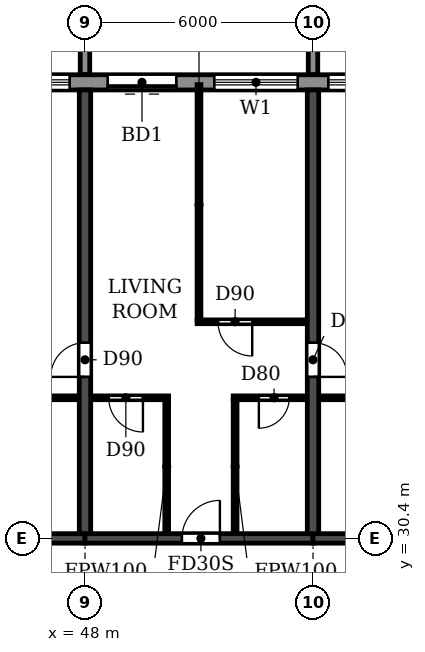
"""IFC4 building model, lengths in metres.
Left out: names, types, materials, properties, quantities, classifications, styles, units other than length and angle.
Written with IfcOpenShell. Run it as: python <this file> out.ifc"""

import sys

from ifc_helpers import new_model, si_unit, direction, frame, frame_2d, origin, place, context, subcontext, project, spatial, polyline, rectangle, outline, extrude, source, transform, mapped, element, fill, save


model = new_model("IFC4")
c1 = context("Model", 3, precision=1e-05, world=origin(), true_north=direction((0.0, 1.0)))
c2 = subcontext(c1, "Body", "Model", "MODEL_VIEW")
j1 = project(units=[si_unit("LENGTHUNIT", "METRE"), si_unit("PLANEANGLEUNIT", "RADIAN")], contexts=[c1])
p1 = place(None, origin())
s1 = spatial("IfcSite", under=j1, at=p1, CompositionType="ELEMENT")
p2 = place(p1, origin())
s2 = spatial("IfcBuilding", under=s1, at=p2, CompositionType="ELEMENT")
p3 = place(p2, frame((0.0, 0.0, 122.4)))
s3 = spatial("IfcBuildingStorey", under=s2, at=p3, CompositionType="ELEMENT", Elevation=122.4)
p4 = place(p3, frame((48.0, 30.525, 0.0), z_axis=(0.0, 0.0, 1.0), x_axis=(0.0, 1.0, 0.0)))
e1 = element("IfcWall", 1, at=p4, inside=s3, PredefinedType="SHEAR", context=c2, shape_type="SweptSolid", body=[
    extrude(rectangle(XDim=11.675, YDim=0.3, at=frame_2d((5.837, 0.0))), origin(), (0.0, 0.0, 1.0), 3.07),
])
p5 = place(p4, frame((4.125, 0.0, 0.0)))
e2 = element("IfcOpeningElement", 2, at=p5, cuts=e1, PredefinedType="OPENING", context=c2, shape_type="SweptSolid", body=[
    extrude(rectangle(XDim=0.9, YDim=2.1, at=frame_2d((0.45, 1.05))), frame((0.0, 0.16, 0.0), z_axis=(0.0, -1.0, 0.0), x_axis=(1.0, 0.0, 0.0)), (0.0, 0.0, 1.0), 0.32),
])
p6 = place(p3, frame((54.0, 30.525, 0.0), z_axis=(0.0, 0.0, 1.0), x_axis=(0.0, 1.0, 0.0)))
e3 = element("IfcWall", 3, at=p6, inside=s3, PredefinedType="SHEAR", context=c2, shape_type="SweptSolid", body=[
    extrude(rectangle(XDim=11.675, YDim=0.3, at=frame_2d((5.837, 0.0))), origin(), (0.0, 0.0, 1.0), 3.07),
])
p7 = place(p6, frame((4.125, 0.0, 0.0)))
e4 = element("IfcOpeningElement", 4, at=p7, cuts=e3, PredefinedType="OPENING", context=c2, shape_type="SweptSolid", body=[
    extrude(rectangle(XDim=0.9, YDim=2.1, at=frame_2d((0.45, 1.05))), frame((0.0, 0.16, 0.0), z_axis=(0.0, -1.0, 0.0), x_axis=(1.0, 0.0, 0.0)), (0.0, 0.0, 1.0), 0.32),
])
p8 = place(p3, frame((42.0, 30.4, 0.0), z_axis=(0.0, 0.0, 1.0), x_axis=(1.0, 0.0, 0.0)))
e5 = element("IfcWall", 5, at=p8, inside=s3, PredefinedType="SHEAR", context=c2, shape_type="SweptSolid", body=[
    extrude(rectangle(XDim=6.0, YDim=0.25, at=frame_2d((3.0, 0.0))), origin(), (0.0, 0.0, 1.0), 2.47),
])
p9 = place(p3, frame((48.0, 30.4, 0.0), z_axis=(0.0, 0.0, 1.0), x_axis=(1.0, 0.0, 0.0)))
e6 = element("IfcWall", 6, at=p9, inside=s3, PredefinedType="SHEAR", context=c2, shape_type="SweptSolid", body=[
    extrude(rectangle(XDim=6.0, YDim=0.25, at=frame_2d((3.0, 0.0))), origin(), (0.0, 0.0, 1.0), 2.47),
])
p10 = place(p9, frame((2.55, 0.0, 0.0)))
e7 = element("IfcOpeningElement", 7, at=p10, cuts=e6, PredefinedType="OPENING", context=c2, shape_type="SweptSolid", body=[
    extrude(rectangle(XDim=1.0, YDim=2.1, at=frame_2d((0.5, 1.05))), frame((0.0, 0.135, 0.0), z_axis=(0.0, -1.0, 0.0), x_axis=(1.0, 0.0, 0.0)), (0.0, 0.0, 1.0), 0.27),
])
p11 = place(p3, frame((54.0, 30.4, 0.0), z_axis=(0.0, 0.0, 1.0), x_axis=(1.0, 0.0, 0.0)))
e8 = element("IfcWall", 8, at=p11, inside=s3, PredefinedType="SHEAR", context=c2, shape_type="SweptSolid", body=[
    extrude(rectangle(XDim=6.0, YDim=0.25, at=frame_2d((3.0, 0.0))), origin(), (0.0, 0.0, 1.0), 2.47),
])
p12 = place(p3, frame((85.317, 42.4, 0.0), z_axis=(0.0, 0.0, 1.0), x_axis=(-1.0, 0.0, 0.0)))
e9 = element("IfcWall", 9, at=p12, inside=s3, PredefinedType="STANDARD", context=c2, shape_type="SweptSolid", body=[
    extrude(rectangle(XDim=68.634, YDim=0.4, at=frame_2d((34.317, 0.0))), origin(), (0.0, 0.0, 1.0), 3.07),
])
p13 = place(p12, frame((64.717, 0.0, 0.9)))
e10 = element("IfcOpeningElement", 10, at=p13, cuts=e9, PredefinedType="OPENING", context=c2, shape_type="SweptSolid", body=[
    extrude(rectangle(XDim=2.2, YDim=1.5, at=frame_2d((1.1, 0.75))), frame((0.0, 0.21, 0.0), z_axis=(0.0, -1.0, 0.0), x_axis=(1.0, 0.0, 0.0)), (0.0, 0.0, 1.0), 0.42),
])
p14 = place(p12, frame((61.917, 0.0, 0.0)))
e11 = element("IfcOpeningElement", 11, at=p14, cuts=e9, PredefinedType="OPENING", context=c2, shape_type="SweptSolid", body=[
    extrude(rectangle(XDim=1.8, YDim=2.4, at=frame_2d((0.9, 1.2))), frame((0.0, 0.21, 0.0), z_axis=(0.0, -1.0, 0.0), x_axis=(1.0, 0.0, 0.0)), (0.0, 0.0, 1.0), 0.42),
])
p15 = place(p12, frame((58.717, 0.0, 0.9)))
e12 = element("IfcOpeningElement", 12, at=p15, cuts=e9, PredefinedType="OPENING", context=c2, shape_type="SweptSolid", body=[
    extrude(rectangle(XDim=2.2, YDim=1.5, at=frame_2d((1.1, 0.75))), frame((0.0, 0.21, 0.0), z_axis=(0.0, -1.0, 0.0), x_axis=(1.0, 0.0, 0.0)), (0.0, 0.0, 1.0), 0.42),
])
p16 = place(p12, frame((55.917, 0.0, 0.0)))
e13 = element("IfcOpeningElement", 13, at=p16, cuts=e9, PredefinedType="OPENING", context=c2, shape_type="SweptSolid", body=[
    extrude(rectangle(XDim=1.8, YDim=2.4, at=frame_2d((0.9, 1.2))), frame((0.0, 0.21, 0.0), z_axis=(0.0, -1.0, 0.0), x_axis=(1.0, 0.0, 0.0)), (0.0, 0.0, 1.0), 0.42),
])
p17 = place(p12, frame((52.717, 0.0, 0.9)))
e14 = element("IfcOpeningElement", 14, at=p17, cuts=e9, PredefinedType="OPENING", context=c2, shape_type="SweptSolid", body=[
    extrude(rectangle(XDim=2.2, YDim=1.5, at=frame_2d((1.1, 0.75))), frame((0.0, 0.21, 0.0), z_axis=(0.0, -1.0, 0.0), x_axis=(1.0, 0.0, 0.0)), (0.0, 0.0, 1.0), 0.42),
])
p18 = place(p12, frame((49.917, 0.0, 0.0)))
e15 = element("IfcOpeningElement", 15, at=p18, cuts=e9, PredefinedType="OPENING", context=c2, shape_type="SweptSolid", body=[
    extrude(rectangle(XDim=1.8, YDim=2.4, at=frame_2d((0.9, 1.2))), frame((0.0, 0.21, 0.0), z_axis=(0.0, -1.0, 0.0), x_axis=(1.0, 0.0, 0.0)), (0.0, 0.0, 1.0), 0.42),
])
p19 = place(p12, frame((46.717, 0.0, 0.9)))
e16 = element("IfcOpeningElement", 16, at=p19, cuts=e9, PredefinedType="OPENING", context=c2, shape_type="SweptSolid", body=[
    extrude(rectangle(XDim=2.2, YDim=1.5, at=frame_2d((1.1, 0.75))), frame((0.0, 0.21, 0.0), z_axis=(0.0, -1.0, 0.0), x_axis=(1.0, 0.0, 0.0)), (0.0, 0.0, 1.0), 0.42),
])
p20 = place(p12, frame((43.917, 0.0, 0.0)))
e17 = element("IfcOpeningElement", 17, at=p20, cuts=e9, PredefinedType="OPENING", context=c2, shape_type="SweptSolid", body=[
    extrude(rectangle(XDim=1.8, YDim=2.4, at=frame_2d((0.9, 1.2))), frame((0.0, 0.21, 0.0), z_axis=(0.0, -1.0, 0.0), x_axis=(1.0, 0.0, 0.0)), (0.0, 0.0, 1.0), 0.42),
])
p21 = place(p12, frame((40.717, 0.0, 0.9)))
e18 = element("IfcOpeningElement", 18, at=p21, cuts=e9, PredefinedType="OPENING", context=c2, shape_type="SweptSolid", body=[
    extrude(rectangle(XDim=2.2, YDim=1.5, at=frame_2d((1.1, 0.75))), frame((0.0, 0.21, 0.0), z_axis=(0.0, -1.0, 0.0), x_axis=(1.0, 0.0, 0.0)), (0.0, 0.0, 1.0), 0.42),
])
p22 = place(p12, frame((37.717, 0.0, 0.9)))
e19 = element("IfcOpeningElement", 19, at=p22, cuts=e9, PredefinedType="OPENING", context=c2, shape_type="SweptSolid", body=[
    extrude(rectangle(XDim=2.2, YDim=1.5, at=frame_2d((1.1, 0.75))), frame((0.0, 0.21, 0.0), z_axis=(0.0, -1.0, 0.0), x_axis=(1.0, 0.0, 0.0)), (0.0, 0.0, 1.0), 0.42),
])
p23 = place(p12, frame((34.917, 0.0, 0.0)))
e20 = element("IfcOpeningElement", 20, at=p23, cuts=e9, PredefinedType="OPENING", context=c2, shape_type="SweptSolid", body=[
    extrude(rectangle(XDim=1.8, YDim=2.4, at=frame_2d((0.9, 1.2))), frame((0.0, 0.21, 0.0), z_axis=(0.0, -1.0, 0.0), x_axis=(1.0, 0.0, 0.0)), (0.0, 0.0, 1.0), 0.42),
])
p24 = place(p12, frame((31.717, 0.0, 0.9)))
e21 = element("IfcOpeningElement", 21, at=p24, cuts=e9, PredefinedType="OPENING", context=c2, shape_type="SweptSolid", body=[
    extrude(rectangle(XDim=2.2, YDim=1.5, at=frame_2d((1.1, 0.75))), frame((0.0, 0.21, 0.0), z_axis=(0.0, -1.0, 0.0), x_axis=(1.0, 0.0, 0.0)), (0.0, 0.0, 1.0), 0.42),
])
p25 = place(p12, frame((28.717, 0.0, 0.9)))
e22 = element("IfcOpeningElement", 22, at=p25, cuts=e9, PredefinedType="OPENING", context=c2, shape_type="SweptSolid", body=[
    extrude(rectangle(XDim=2.2, YDim=1.5, at=frame_2d((1.1, 0.75))), frame((0.0, 0.21, 0.0), z_axis=(0.0, -1.0, 0.0), x_axis=(1.0, 0.0, 0.0)), (0.0, 0.0, 1.0), 0.42),
])
p26 = place(p12, frame((25.717, 0.0, 0.9)))
e23 = element("IfcOpeningElement", 23, at=p26, cuts=e9, PredefinedType="OPENING", context=c2, shape_type="SweptSolid", body=[
    extrude(rectangle(XDim=2.2, YDim=1.5, at=frame_2d((1.1, 0.75))), frame((0.0, 0.21, 0.0), z_axis=(0.0, -1.0, 0.0), x_axis=(1.0, 0.0, 0.0)), (0.0, 0.0, 1.0), 0.42),
])
p27 = place(p12, frame((22.717, 0.0, 0.9)))
e24 = element("IfcOpeningElement", 24, at=p27, cuts=e9, PredefinedType="OPENING", context=c2, shape_type="SweptSolid", body=[
    extrude(rectangle(XDim=2.2, YDim=1.5, at=frame_2d((1.1, 0.75))), frame((0.0, 0.21, 0.0), z_axis=(0.0, -1.0, 0.0), x_axis=(1.0, 0.0, 0.0)), (0.0, 0.0, 1.0), 0.42),
])
p28 = place(p12, frame((19.917, 0.0, 0.0)))
e25 = element("IfcOpeningElement", 25, at=p28, cuts=e9, PredefinedType="OPENING", context=c2, shape_type="SweptSolid", body=[
    extrude(rectangle(XDim=1.8, YDim=2.4, at=frame_2d((0.9, 1.2))), frame((0.0, 0.21, 0.0), z_axis=(0.0, -1.0, 0.0), x_axis=(1.0, 0.0, 0.0)), (0.0, 0.0, 1.0), 0.42),
])
p29 = place(p12, frame((16.917, 0.0, 0.0)))
e26 = element("IfcOpeningElement", 26, at=p29, cuts=e9, PredefinedType="OPENING", context=c2, shape_type="SweptSolid", body=[
    extrude(rectangle(XDim=1.8, YDim=2.4, at=frame_2d((0.9, 1.2))), frame((0.0, 0.21, 0.0), z_axis=(0.0, -1.0, 0.0), x_axis=(1.0, 0.0, 0.0)), (0.0, 0.0, 1.0), 0.42),
])
p30 = place(p12, frame((13.717, 0.0, 0.9)))
e27 = element("IfcOpeningElement", 27, at=p30, cuts=e9, PredefinedType="OPENING", context=c2, shape_type="SweptSolid", body=[
    extrude(rectangle(XDim=2.2, YDim=1.5, at=frame_2d((1.1, 0.75))), frame((0.0, 0.21, 0.0), z_axis=(0.0, -1.0, 0.0), x_axis=(1.0, 0.0, 0.0)), (0.0, 0.0, 1.0), 0.42),
])
p31 = place(p12, frame((10.717, 0.0, 0.9)))
e28 = element("IfcOpeningElement", 28, at=p31, cuts=e9, PredefinedType="OPENING", context=c2, shape_type="SweptSolid", body=[
    extrude(rectangle(XDim=2.2, YDim=1.5, at=frame_2d((1.1, 0.75))), frame((0.0, 0.21, 0.0), z_axis=(0.0, -1.0, 0.0), x_axis=(1.0, 0.0, 0.0)), (0.0, 0.0, 1.0), 0.42),
])
p32 = place(p12, frame((7.717, 0.0, 0.9)))
e29 = element("IfcOpeningElement", 29, at=p32, cuts=e9, PredefinedType="OPENING", context=c2, shape_type="SweptSolid", body=[
    extrude(rectangle(XDim=2.2, YDim=1.5, at=frame_2d((1.1, 0.75))), frame((0.0, 0.21, 0.0), z_axis=(0.0, -1.0, 0.0), x_axis=(1.0, 0.0, 0.0)), (0.0, 0.0, 1.0), 0.42),
])
p33 = place(p12, frame((4.917, 0.0, 0.0)))
e30 = element("IfcOpeningElement", 30, at=p33, cuts=e9, PredefinedType="OPENING", context=c2, shape_type="SweptSolid", body=[
    extrude(rectangle(XDim=1.8, YDim=2.4, at=frame_2d((0.9, 1.2))), frame((0.0, 0.21, 0.0), z_axis=(0.0, -1.0, 0.0), x_axis=(1.0, 0.0, 0.0)), (0.0, 0.0, 1.0), 0.42),
])
p34 = place(p12, frame((1.717, 0.0, 0.9)))
e31 = element("IfcOpeningElement", 31, at=p34, cuts=e9, PredefinedType="OPENING", context=c2, shape_type="SweptSolid", body=[
    extrude(rectangle(XDim=2.2, YDim=1.5, at=frame_2d((1.1, 0.75))), frame((0.0, 0.21, 0.0), z_axis=(0.0, -1.0, 0.0), x_axis=(1.0, 0.0, 0.0)), (0.0, 0.0, 1.0), 0.42),
])
m1 = source(origin(), c2, "Body", "SweptSolid", [
    extrude(outline(polyline([(0.0, 0.0), (0.25, 0.0), (0.25, 3.1), (0.0, 3.1), (0.0, 0.0)])), origin(), (0.0, 0.0, 1.0), 3.1),
])
for number, where in (
    (32, (47.875, 42.6, 0.0)),
    (33, (53.875, 42.6, 0.0)),
):
    element("IfcWall", number, at=place(p3, frame(where)), inside=s3, PredefinedType="STANDARD", context=c2, shape_type="MappedRepresentation", body=[
        mapped(m1, transform((0.0, 0.0, 0.0))),
    ])
p35 = place(p3, frame((45.1, 34.1, 0.0), z_axis=(0.0, 0.0, 1.0), x_axis=(1.0, 0.0, 0.0)))
e34 = element("IfcWall", 34, at=p35, inside=s3, PredefinedType="PARTITIONING", context=c2, shape_type="SweptSolid", body=[
    extrude(rectangle(XDim=2.74, YDim=0.1, at=frame_2d((1.37, 0.0))), origin(), (0.0, 0.0, 1.0), 3.07),
])
p36 = place(p35, frame((1.0, 0.0, 0.0)))
e35 = element("IfcOpeningElement", 35, at=p36, cuts=e34, PredefinedType="OPENING", context=c2, shape_type="SweptSolid", body=[
    extrude(rectangle(XDim=0.8, YDim=2.1, at=frame_2d((0.4, 1.05))), frame((0.0, 0.06, 0.0), z_axis=(0.0, -1.0, 0.0), x_axis=(1.0, 0.0, 0.0)), (0.0, 0.0, 1.0), 0.12),
])
p37 = place(p3, frame((48.16, 34.1, 0.0), z_axis=(0.0, 0.0, 1.0), x_axis=(1.0, 0.0, 0.0)))
e36 = element("IfcWall", 36, at=p37, inside=s3, PredefinedType="PARTITIONING", context=c2, shape_type="SweptSolid", body=[
    extrude(rectangle(XDim=2.04, YDim=0.1, at=frame_2d((1.02, 0.0))), origin(), (0.0, 0.0, 1.0), 3.07),
])
p38 = place(p37, frame((0.465, 0.0, 0.0)))
e37 = element("IfcOpeningElement", 37, at=p38, cuts=e36, PredefinedType="OPENING", context=c2, shape_type="SweptSolid", body=[
    extrude(rectangle(XDim=0.9, YDim=2.1, at=frame_2d((0.45, 1.05))), frame((0.0, 0.06, 0.0), z_axis=(0.0, -1.0, 0.0), x_axis=(1.0, 0.0, 0.0)), (0.0, 0.0, 1.0), 0.12),
])
p39 = place(p3, frame((51.9, 34.1, 0.0), z_axis=(0.0, 0.0, 1.0), x_axis=(1.0, 0.0, 0.0)))
e38 = element("IfcWall", 38, at=p39, inside=s3, PredefinedType="PARTITIONING", context=c2, shape_type="SweptSolid", body=[
    extrude(rectangle(XDim=1.94, YDim=0.1, at=frame_2d((0.97, 0.0))), origin(), (0.0, 0.0, 1.0), 3.07),
])
p40 = place(p39, frame((0.675, 0.0, 0.0)))
e39 = element("IfcOpeningElement", 39, at=p40, cuts=e38, PredefinedType="OPENING", context=c2, shape_type="SweptSolid", body=[
    extrude(rectangle(XDim=0.8, YDim=2.1, at=frame_2d((0.4, 1.05))), frame((0.0, 0.06, 0.0), z_axis=(0.0, -1.0, 0.0), x_axis=(1.0, 0.0, 0.0)), (0.0, 0.0, 1.0), 0.12),
])
p41 = place(p3, frame((54.16, 34.1, 0.0), z_axis=(0.0, 0.0, 1.0), x_axis=(1.0, 0.0, 0.0)))
e40 = element("IfcWall", 40, at=p41, inside=s3, PredefinedType="PARTITIONING", context=c2, shape_type="SweptSolid", body=[
    extrude(rectangle(XDim=2.74, YDim=0.1, at=frame_2d((1.37, 0.0))), origin(), (0.0, 0.0, 1.0), 3.07),
])
p42 = place(p41, frame((0.94, 0.0, 0.0)))
e41 = element("IfcOpeningElement", 41, at=p42, cuts=e40, PredefinedType="OPENING", context=c2, shape_type="SweptSolid", body=[
    extrude(rectangle(XDim=0.8, YDim=2.1, at=frame_2d((0.4, 1.05))), frame((0.0, 0.06, 0.0), z_axis=(0.0, -1.0, 0.0), x_axis=(1.0, 0.0, 0.0)), (0.0, 0.0, 1.0), 0.12),
])
p43 = place(p3, frame((50.95, 36.1, 0.0), z_axis=(0.0, 0.0, 1.0), x_axis=(1.0, 0.0, 0.0)))
e42 = element("IfcWall", 42, at=p43, inside=s3, PredefinedType="PARTITIONING", context=c2, shape_type="SweptSolid", body=[
    extrude(rectangle(XDim=2.89, YDim=0.1, at=frame_2d((1.445, 0.0))), origin(), (0.0, 0.0, 1.0), 3.07),
])
p44 = place(p43, frame((0.55, 0.0, 0.0)))
e43 = element("IfcOpeningElement", 43, at=p44, cuts=e42, PredefinedType="OPENING", context=c2, shape_type="SweptSolid", body=[
    extrude(rectangle(XDim=0.9, YDim=2.1, at=frame_2d((0.45, 1.05))), frame((0.0, 0.06, 0.0), z_axis=(0.0, -1.0, 0.0), x_axis=(1.0, 0.0, 0.0)), (0.0, 0.0, 1.0), 0.12),
])
p45 = place(p3, frame((50.15, 30.535, 0.0), z_axis=(0.0, 0.0, 1.0), x_axis=(0.0, 1.0, 0.0)))
e44 = element("IfcWall", 44, at=p45, inside=s3, PredefinedType="PARTITIONING", context=c2, shape_type="SweptSolid", body=[
    extrude(rectangle(XDim=3.515, YDim=0.1, at=frame_2d((1.758, 0.0))), origin(), (0.0, 0.0, 1.0), 3.07),
])
p46 = place(p3, frame((51.0, 36.15, 0.0), z_axis=(0.0, 0.0, 1.0), x_axis=(0.0, 1.0, 0.0)))
e45 = element("IfcWall", 45, at=p46, inside=s3, PredefinedType="PARTITIONING", context=c2, shape_type="SweptSolid", body=[
    extrude(rectangle(XDim=6.19, YDim=0.1, at=frame_2d((3.095, 0.0))), origin(), (0.0, 0.0, 1.0), 3.07),
])
p47 = place(p3, frame((51.95, 30.535, 0.0), z_axis=(0.0, 0.0, 1.0), x_axis=(0.0, 1.0, 0.0)))
e46 = element("IfcWall", 46, at=p47, inside=s3, PredefinedType="PARTITIONING", context=c2, shape_type="SweptSolid", body=[
    extrude(rectangle(XDim=3.515, YDim=0.1, at=frame_2d((1.758, 0.0))), origin(), (0.0, 0.0, 1.0), 3.07),
])
p48 = place(p22, origin())
e47 = element("IfcWindow", 47, at=p48, inside=s3, PartitioningType="DOUBLE_PANEL_HORIZONTAL", PredefinedType="WINDOW", context=c2, shape_type="SweptSolid", body=[
    extrude(rectangle(XDim=2.2, YDim=1.5, at=frame_2d((1.1, 0.75))), frame((0.0, 0.03, 0.0), z_axis=(0.0, -1.0, 0.0), x_axis=(1.0, 0.0, 0.0)), (0.0, 0.0, 1.0), 0.06),
])
fill(e19, e47)
p49 = place(p23, origin())
e48 = element("IfcDoor", 48, at=p49, inside=s3, OperationType="DOUBLE_DOOR_SLIDING", PredefinedType="DOOR", context=c2, shape_type="SweptSolid", body=[
    extrude(rectangle(XDim=1.8, YDim=2.4, at=frame_2d((0.9, 1.2))), frame((0.0, 0.025, 0.0), z_axis=(0.0, -1.0, 0.0), x_axis=(1.0, 0.0, 0.0)), (0.0, 0.0, 1.0), 0.05),
])
fill(e20, e48)
p50 = place(p24, origin())
e49 = element("IfcWindow", 49, at=p50, inside=s3, PartitioningType="DOUBLE_PANEL_HORIZONTAL", PredefinedType="WINDOW", context=c2, shape_type="SweptSolid", body=[
    extrude(rectangle(XDim=2.2, YDim=1.5, at=frame_2d((1.1, 0.75))), frame((0.0, 0.03, 0.0), z_axis=(0.0, -1.0, 0.0), x_axis=(1.0, 0.0, 0.0)), (0.0, 0.0, 1.0), 0.06),
])
fill(e21, e49)
p51 = place(p25, origin())
e50 = element("IfcWindow", 50, at=p51, inside=s3, PartitioningType="DOUBLE_PANEL_HORIZONTAL", PredefinedType="WINDOW", context=c2, shape_type="SweptSolid", body=[
    extrude(rectangle(XDim=2.2, YDim=1.5, at=frame_2d((1.1, 0.75))), frame((0.0, 0.03, 0.0), z_axis=(0.0, -1.0, 0.0), x_axis=(1.0, 0.0, 0.0)), (0.0, 0.0, 1.0), 0.06),
])
fill(e22, e50)
p52 = place(p5, origin())
e51 = element("IfcDoor", 51, at=p52, inside=s3, OperationType="SINGLE_SWING_LEFT", PredefinedType="DOOR", context=c2, shape_type="SweptSolid", body=[
    extrude(rectangle(XDim=0.9, YDim=2.1, at=frame_2d((0.45, 1.05))), frame((0.0, 0.025, 0.0), z_axis=(0.0, -1.0, 0.0), x_axis=(1.0, 0.0, 0.0)), (0.0, 0.0, 1.0), 0.05),
])
fill(e2, e51)
p53 = place(p38, frame((0.9, 0.0, 0.0), z_axis=(0.0, 0.0, 1.0), x_axis=(-1.0, 0.0, 0.0)))
e52 = element("IfcDoor", 52, at=p53, inside=s3, OperationType="SINGLE_SWING_LEFT", PredefinedType="DOOR", context=c2, shape_type="SweptSolid", body=[
    extrude(rectangle(XDim=0.9, YDim=2.1, at=frame_2d((0.45, 1.05))), frame((0.0, 0.025, 0.0), z_axis=(0.0, -1.0, 0.0), x_axis=(1.0, 0.0, 0.0)), (0.0, 0.0, 1.0), 0.05),
])
fill(e37, e52)
p54 = place(p10, origin())
e53 = element("IfcDoor", 53, at=p54, inside=s3, OperationType="SINGLE_SWING_RIGHT", PredefinedType="DOOR", context=c2, shape_type="SweptSolid", body=[
    extrude(rectangle(XDim=1.0, YDim=2.1, at=frame_2d((0.5, 1.05))), frame((0.0, 0.025, 0.0), z_axis=(0.0, -1.0, 0.0), x_axis=(1.0, 0.0, 0.0)), (0.0, 0.0, 1.0), 0.05),
])
fill(e7, e53)
p55 = place(p44, frame((0.9, 0.0, 0.0), z_axis=(0.0, 0.0, 1.0), x_axis=(-1.0, 0.0, 0.0)))
e54 = element("IfcDoor", 54, at=p55, inside=s3, OperationType="SINGLE_SWING_LEFT", PredefinedType="DOOR", context=c2, shape_type="SweptSolid", body=[
    extrude(rectangle(XDim=0.9, YDim=2.1, at=frame_2d((0.45, 1.05))), frame((0.0, 0.025, 0.0), z_axis=(0.0, -1.0, 0.0), x_axis=(1.0, 0.0, 0.0)), (0.0, 0.0, 1.0), 0.05),
])
fill(e43, e54)
p56 = place(p40, frame((0.8, 0.0, 0.0), z_axis=(0.0, 0.0, 1.0), x_axis=(-1.0, 0.0, 0.0)))
e55 = element("IfcDoor", 55, at=p56, inside=s3, OperationType="SINGLE_SWING_RIGHT", PredefinedType="DOOR", context=c2, shape_type="SweptSolid", body=[
    extrude(rectangle(XDim=0.8, YDim=2.1, at=frame_2d((0.4, 1.05))), frame((0.0, 0.025, 0.0), z_axis=(0.0, -1.0, 0.0), x_axis=(1.0, 0.0, 0.0)), (0.0, 0.0, 1.0), 0.05),
])
fill(e39, e55)
p57 = place(p7, frame((0.9, 0.0, 0.0), z_axis=(0.0, 0.0, 1.0), x_axis=(-1.0, 0.0, 0.0)))
e56 = element("IfcDoor", 56, at=p57, inside=s3, OperationType="SINGLE_SWING_RIGHT", PredefinedType="DOOR", context=c2, shape_type="SweptSolid", body=[
    extrude(rectangle(XDim=0.9, YDim=2.1, at=frame_2d((0.45, 1.05))), frame((0.0, 0.025, 0.0), z_axis=(0.0, -1.0, 0.0), x_axis=(1.0, 0.0, 0.0)), (0.0, 0.0, 1.0), 0.05),
])
fill(e4, e56)
save(model, sys.argv[1])
